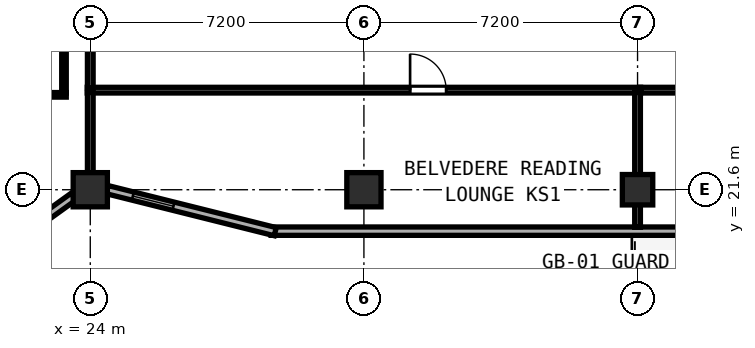
"""IFC4 building model, lengths in metres.
Left out: names, types, materials, properties, quantities, classifications, styles, units other than length and angle.
Written with IfcOpenShell. Run it as: python <this file> out.ifc"""

import sys

from ifc_helpers import new_model, si_unit, direction, frame, frame_2d, origin, origin_2d, place, context, subcontext, project, spatial, rectangle, hollow_rectangle, extrude, element, fill, save


model = new_model("IFC4")
c1 = context("Model", 3, precision=1e-05, world=origin(), true_north=direction((0.0, 1.0)))
c2 = subcontext(c1, "Body", "Model", "MODEL_VIEW")
j1 = project(units=[si_unit("LENGTHUNIT", "METRE"), si_unit("PLANEANGLEUNIT", "RADIAN")], contexts=[c1])
p1 = place(None, origin())
s1 = spatial("IfcSite", under=j1, at=p1, CompositionType="ELEMENT")
p2 = place(p1, origin())
s2 = spatial("IfcBuilding", under=s1, at=p2, CompositionType="ELEMENT")
p3 = place(p2, frame((0.0, 0.0, 199.4)))
s3 = spatial("IfcBuildingStorey", under=s2, at=p3, CompositionType="ELEMENT", Elevation=199.4)
for number, where, z_axis, x_axis in (
    (1, (24.0, 21.6, 0.0), (0.0, 0.0, 1.0), (1.0, 0.0, 0.0)),
    (2, (31.2, 21.6, 0.0), (0.0, 0.0, 1.0), (1.0, 0.0, 0.0)),
):
    element("IfcColumn", number, at=place(p3, frame(where, z_axis=z_axis, x_axis=x_axis)), inside=s3, PredefinedType="COLUMN", context=c2, shape_type="SweptSolid", body=[
        extrude(hollow_rectangle(XDim=0.9, YDim=0.9, WallThickness=0.034, at=origin_2d()), origin(), (0.0, 0.0, 1.0), 3.8),
    ])
p4 = place(p3, frame((38.4, 21.6, 0.0), z_axis=(0.0, 0.0, 1.0), x_axis=(1.0, 0.0, 0.0)))
e3 = element("IfcColumn", 3, at=p4, inside=s3, PredefinedType="COLUMN", context=c2, shape_type="SweptSolid", body=[
    extrude(hollow_rectangle(XDim=0.8, YDim=0.8, WallThickness=0.03, at=origin_2d()), origin(), (0.0, 0.0, 1.0), 3.8),
])
p5 = place(p3, frame((28.759, 20.51, 0.0), z_axis=(0.0, 0.0, 1.0), x_axis=(1.0, 0.0, 0.0)))
e4 = element("IfcWall", 4, at=p5, inside=s3, PredefinedType="SOLIDWALL", context=c2, shape_type="SweptSolid", body=[
    extrude(rectangle(XDim=19.283, YDim=0.22, at=frame_2d((9.642, 0.0))), origin(), (0.0, 0.0, 1.0), 3.62),
])
p6 = place(p5, frame((15.641, 0.0, 0.0), z_axis=(0.0, 0.0, 1.0), x_axis=(-1.0, 0.0, 0.0)))
e5 = element("IfcOpeningElement", 5, at=p6, cuts=e4, PredefinedType="OPENING", context=c2, shape_type="SweptSolid", body=[
    extrude(rectangle(XDim=1.2, YDim=2.15, at=frame_2d((0.6, 1.075))), frame((0.0, 0.12, 0.0), z_axis=(0.0, -1.0, 0.0), x_axis=(1.0, 0.0, 0.0)), (0.0, 0.0, 1.0), 0.24),
])
p7 = place(p3, frame((14.065, 14.583, 0.0), z_axis=(0.0, 0.0, 1.0), x_axis=(0.811534737332, 0.58430417601, 0.0)))
e6 = element("IfcWall", 6, at=p7, inside=s3, PredefinedType="SOLIDWALL", context=c2, shape_type="SweptSolid", body=[
    extrude(rectangle(XDim=11.697, YDim=0.22, at=frame_2d((5.849, 0.0))), origin(), (0.0, 0.0, 1.0), 3.215),
])
p8 = place(p7, frame((0.7, 0.0, 0.85)))
e7 = element("IfcOpeningElement", 7, at=p8, cuts=e6, PredefinedType="OPENING", context=c2, shape_type="SweptSolid", body=[
    extrude(rectangle(XDim=1.1, YDim=1.75, at=frame_2d((0.55, 0.875))), frame((0.0, 0.12, 0.0), z_axis=(0.0, -1.0, 0.0), x_axis=(1.0, 0.0, 0.0)), (0.0, 0.0, 1.0), 0.24),
])
p9 = place(p7, frame((6.1, 0.0, 0.85)))
e8 = element("IfcOpeningElement", 8, at=p9, cuts=e6, PredefinedType="OPENING", context=c2, shape_type="SweptSolid", body=[
    extrude(rectangle(XDim=1.1, YDim=1.75, at=frame_2d((0.55, 0.875))), frame((0.0, 0.12, 0.0), z_axis=(0.0, -1.0, 0.0), x_axis=(1.0, 0.0, 0.0)), (0.0, 0.0, 1.0), 0.24),
])
p10 = place(p7, frame((9.38, 0.0, 0.85)))
e9 = element("IfcOpeningElement", 9, at=p10, cuts=e6, PredefinedType="OPENING", context=c2, shape_type="SweptSolid", body=[
    extrude(rectangle(XDim=1.1, YDim=1.75, at=frame_2d((0.55, 0.875))), frame((0.0, 0.12, 0.0), z_axis=(0.0, -1.0, 0.0), x_axis=(1.0, 0.0, 0.0)), (0.0, 0.0, 1.0), 0.24),
])
p11 = place(p3, frame((24.442, 21.603, 0.0), z_axis=(0.0, 0.0, 1.0), x_axis=(0.970145648609, -0.242523030833, 0.0)))
e10 = element("IfcWall", 10, at=p11, inside=s3, PredefinedType="SOLIDWALL", context=c2, shape_type="SweptSolid", body=[
    extrude(rectangle(XDim=4.561, YDim=0.22, at=frame_2d((2.281, 0.0))), origin(), (0.0, 0.0, 1.0), 3.215),
])
p12 = place(p11, frame((0.7, 0.0, 0.85)))
e11 = element("IfcOpeningElement", 11, at=p12, cuts=e10, PredefinedType="OPENING", context=c2, shape_type="SweptSolid", body=[
    extrude(rectangle(XDim=1.1, YDim=1.75, at=frame_2d((0.55, 0.875))), frame((0.0, 0.12, 0.0), z_axis=(0.0, -1.0, 0.0), x_axis=(1.0, 0.0, 0.0)), (0.0, 0.0, 1.0), 0.24),
])
p13 = place(p3, frame((23.92, 24.22, 0.0), z_axis=(0.0, 0.0, 1.0), x_axis=(1.0, 0.0, 0.0)))
e12 = element("IfcWall", 12, at=p13, inside=s3, PredefinedType="PARTITIONING", context=c2, shape_type="SweptSolid", body=[
    extrude(rectangle(XDim=14.56, YDim=0.15, at=frame_2d((7.28, 0.0))), origin(), (0.0, 0.0, 1.0), 3.62),
])
p14 = place(p13, frame((9.445, 0.0, 0.0), z_axis=(0.0, 0.0, 1.0), x_axis=(-1.0, 0.0, 0.0)))
e13 = element("IfcOpeningElement", 13, at=p14, cuts=e12, PredefinedType="OPENING", context=c2, shape_type="SweptSolid", body=[
    extrude(rectangle(XDim=0.95, YDim=2.12, at=frame_2d((0.475, 1.06))), frame((0.0, 0.085, 0.0), z_axis=(0.0, -1.0, 0.0), x_axis=(1.0, 0.0, 0.0)), (0.0, 0.0, 1.0), 0.17),
])
p15 = place(p3, frame((24.0, 21.819, 0.0), z_axis=(0.0, 0.0, 1.0), x_axis=(0.0, 1.0, 0.0)))
e14 = element("IfcWall", 14, at=p15, inside=s3, PredefinedType="PARTITIONING", context=c2, shape_type="SweptSolid", body=[
    extrude(rectangle(XDim=2.341, YDim=0.15, at=frame_2d((1.171, 0.0))), origin(), (0.0, 0.0, 1.0), 3.215),
])
p16 = place(p3, frame((38.4, 20.612, 0.0), z_axis=(0.0, 0.0, 1.0), x_axis=(0.0, 1.0, 0.0)))
e15 = element("IfcWall", 15, at=p16, inside=s3, PredefinedType="PARTITIONING", context=c2, shape_type="SweptSolid", body=[
    extrude(rectangle(XDim=3.548, YDim=0.15, at=frame_2d((1.774, 0.0))), origin(), (0.0, 0.0, 1.0), 3.105),
])
p17 = place(p3, frame((38.482, 24.22, 0.0), z_axis=(0.0, 0.0, 1.0), x_axis=(1.0, 0.0, 0.0)))
e16 = element("IfcWall", 16, at=p17, inside=s3, PredefinedType="PARTITIONING", context=c2, shape_type="SweptSolid", body=[
    extrude(rectangle(XDim=7.198, YDim=0.15, at=frame_2d((3.599, 0.0))), origin(), (0.0, 0.0, 1.0), 3.62),
])
p18 = place(p17, frame((3.913, 0.0, 0.0), z_axis=(0.0, 0.0, 1.0), x_axis=(-1.0, 0.0, 0.0)))
e17 = element("IfcOpeningElement", 17, at=p18, cuts=e16, PredefinedType="OPENING", context=c2, shape_type="SweptSolid", body=[
    extrude(rectangle(XDim=0.95, YDim=2.12, at=frame_2d((0.475, 1.06))), frame((0.0, 0.085, 0.0), z_axis=(0.0, -1.0, 0.0), x_axis=(1.0, 0.0, 0.0)), (0.0, 0.0, 1.0), 0.17),
])
p19 = place(p3, frame((24.0, 24.28, 0.0), z_axis=(0.0, 0.0, 1.0), x_axis=(0.0, 1.0, 0.0)))
e18 = element("IfcWall", 18, at=p19, inside=s3, PredefinedType="PARTITIONING", context=c2, shape_type="SweptSolid", body=[
    extrude(rectangle(XDim=2.01, YDim=0.15, at=frame_2d((1.005, 0.0))), origin(), (0.0, 0.0, 1.0), 3.215),
])
p20 = place(p3, frame((21.268, 24.097, 0.0), z_axis=(0.0, 0.0, 1.0), x_axis=(1.0, 0.0, 0.0)))
e19 = element("IfcWall", 19, at=p20, inside=s3, PredefinedType="PARTITIONING", context=c2, shape_type="SweptSolid", body=[
    extrude(rectangle(XDim=2.1, YDim=0.12, at=frame_2d((1.05, 0.0))), origin(), (0.0, 0.0, 1.0), 3.62),
])
p21 = place(p3, frame((23.308, 24.142, 0.0), z_axis=(0.0, 0.0, 1.0), x_axis=(0.0, 1.0, 0.0)))
e20 = element("IfcWall", 20, at=p21, inside=s3, PredefinedType="PARTITIONING", context=c2, shape_type="SweptSolid", body=[
    extrude(rectangle(XDim=1.83, YDim=0.12, at=frame_2d((0.915, 0.0))), origin(), (0.0, 0.0, 1.0), 3.62),
])
p22 = place(p12, origin())
e21 = element("IfcWindow", 21, at=p22, inside=s3, PartitioningType="SINGLE_PANEL", PredefinedType="WINDOW", context=c2, shape_type="SweptSolid", body=[
    extrude(rectangle(XDim=1.1, YDim=1.75, at=frame_2d((0.55, 0.875))), frame((0.0, 0.03, 0.0), z_axis=(0.0, -1.0, 0.0), x_axis=(1.0, 0.0, 0.0)), (0.0, 0.0, 1.0), 0.06),
])
fill(e11, e21)
p23 = place(p14, origin())
e22 = element("IfcDoor", 22, at=p23, inside=s3, OperationType="SINGLE_SWING_RIGHT", PredefinedType="DOOR", context=c2, shape_type="SweptSolid", body=[
    extrude(rectangle(XDim=0.95, YDim=2.12, at=frame_2d((0.475, 1.06))), frame((0.0, 0.025, 0.0), z_axis=(0.0, -1.0, 0.0), x_axis=(1.0, 0.0, 0.0)), (0.0, 0.0, 1.0), 0.05),
])
fill(e13, e22)
save(model, sys.argv[1])
